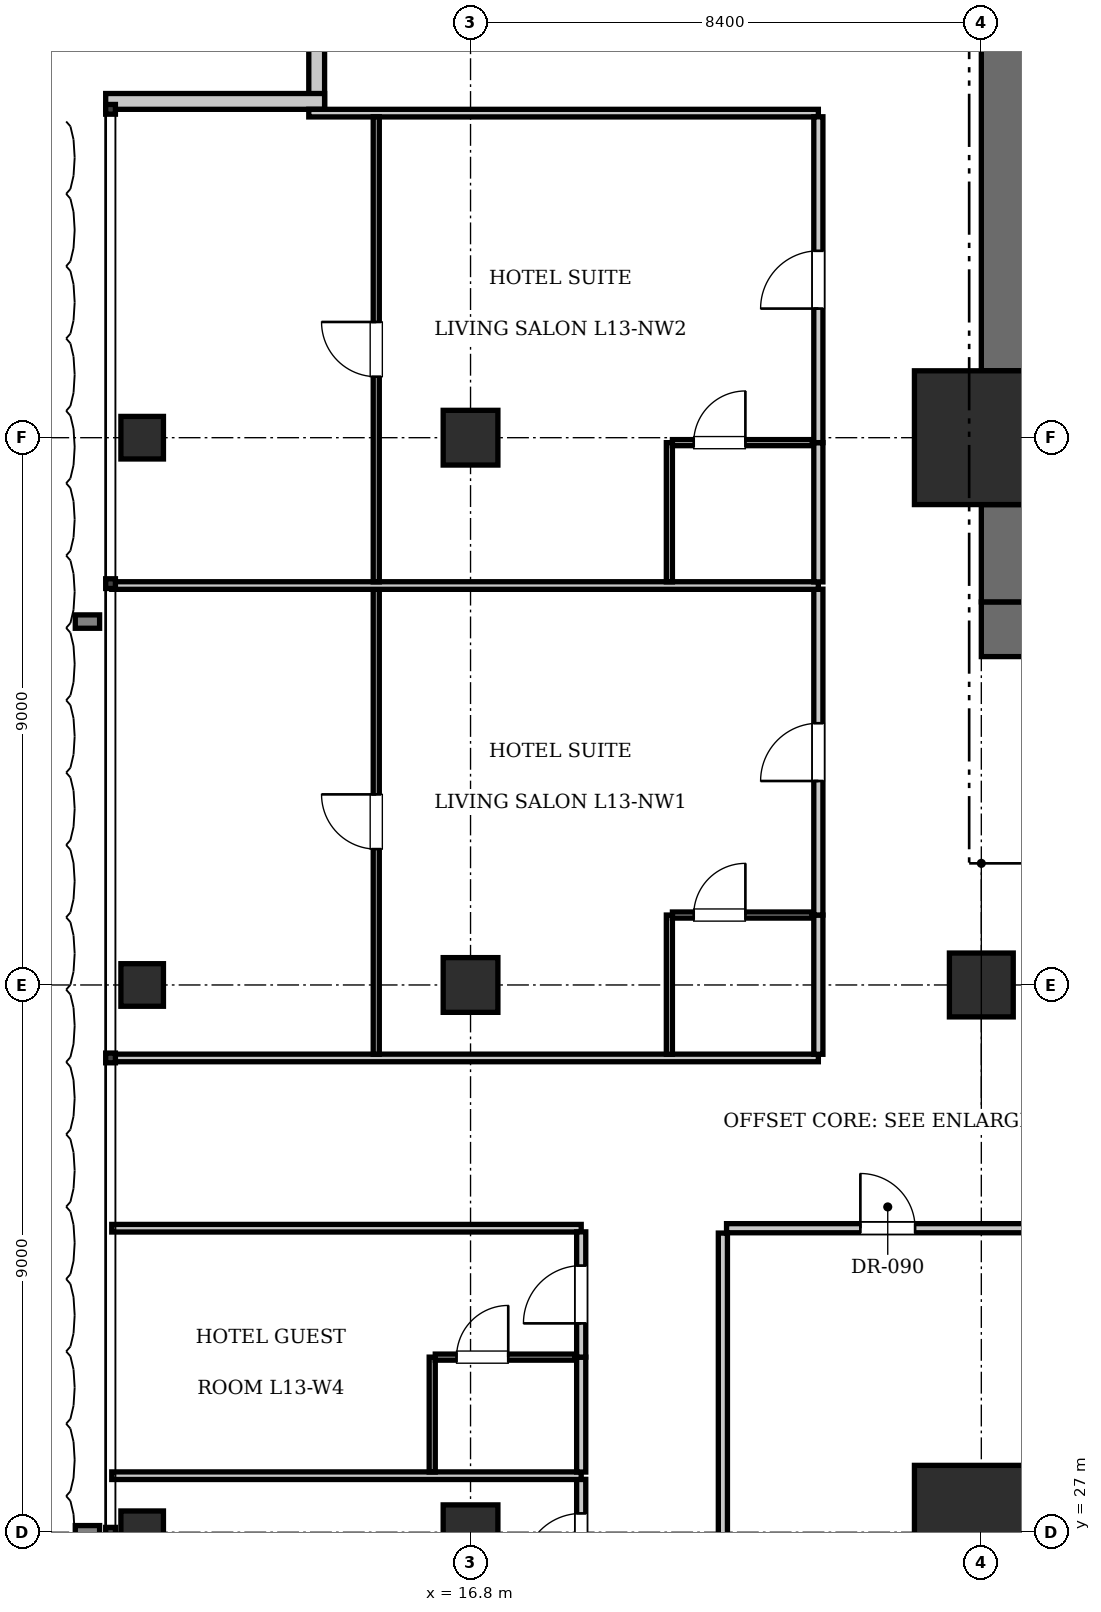
"""IFC4 building model, lengths in metres.
Left out: names, types, materials, properties, quantities, classifications, styles, units other than length and angle.
Written with IfcOpenShell. Run it as: python <this file> out.ifc"""

import sys

from ifc_helpers import new_model, si_unit, direction, frame, frame_2d, origin, origin_2d, place, context, subcontext, project, spatial, rectangle, i_section, extrude, element, fill, save


model = new_model("IFC4")
c1 = context("Model", 3, precision=1e-05, world=origin(), true_north=direction((0.0, 1.0)))
c2 = subcontext(c1, "Body", "Model", "MODEL_VIEW")
j1 = project(units=[si_unit("LENGTHUNIT", "METRE"), si_unit("PLANEANGLEUNIT", "RADIAN")], contexts=[c1])
p1 = place(None, origin())
s1 = spatial("IfcSite", under=j1, at=p1, CompositionType="ELEMENT")
p2 = place(p1, origin())
s2 = spatial("IfcBuilding", under=s1, at=p2, CompositionType="ELEMENT")
p3 = place(p2, frame((0.0, 0.0, 57.75)))
s3 = spatial("IfcBuildingStorey", under=s2, at=p3, CompositionType="ELEMENT", Elevation=57.75)
for number, where, z_axis, x_axis in (
    (1, (25.2, 27.0, 0.0), (0.0, 0.0, 1.0), (1.0, 0.0, 0.0)),
    (2, (25.2, 45.0, 0.0), (0.0, 0.0, 1.0), (1.0, 0.0, 0.0)),
):
    element("IfcColumn", number, at=place(p3, frame(where, z_axis=z_axis, x_axis=x_axis)), inside=s3, PredefinedType="COLUMN", context=c2, shape_type="SweptSolid", body=[
        extrude(rectangle(XDim=2.2, YDim=2.2, at=origin_2d()), origin(), (0.0, 0.0, 1.0), 3.85),
    ])
p4 = place(p3, frame((25.2, 41.85, 0.0), z_axis=(0.0, 0.0, 1.0), x_axis=(1.0, 0.0, 0.0)))
e3 = element("IfcWall", 3, at=p4, inside=s3, PredefinedType="SHEAR", context=c2, shape_type="SweptSolid", body=[
    extrude(rectangle(XDim=6.8, YDim=0.9, at=frame_2d((3.4, 0.0))), origin(), (0.0, 0.0, 1.0), 3.85),
])
p5 = place(p4, frame((1.65, 0.0, 0.0)))
e4 = element("IfcOpeningElement", 4, at=p5, cuts=e3, PredefinedType="OPENING", context=c2, shape_type="SweptSolid", body=[
    extrude(rectangle(XDim=1.15, YDim=2.15, at=frame_2d((0.575, 1.075))), frame((0.0, 0.46, 0.0), z_axis=(0.0, -1.0, 0.0), x_axis=(1.0, 0.0, 0.0)), (0.0, 0.0, 1.0), 0.92),
])
p6 = place(p4, frame((5.15, 0.0, 0.0)))
e5 = element("IfcOpeningElement", 5, at=p6, cuts=e3, PredefinedType="OPENING", context=c2, shape_type="SweptSolid", body=[
    extrude(rectangle(XDim=1.1, YDim=2.2, at=frame_2d((0.55, 1.1))), frame((0.0, 0.46, 0.0), z_axis=(0.0, -1.0, 0.0), x_axis=(1.0, 0.0, 0.0)), (0.0, 0.0, 1.0), 0.92),
])
p7 = place(p3, frame((25.65, 42.3, 0.0), z_axis=(0.0, 0.0, 1.0), x_axis=(0.0, 1.0, 0.0)))
e6 = element("IfcWall", 6, at=p7, inside=s3, PredefinedType="SHEAR", context=c2, shape_type="SweptSolid", body=[
    extrude(rectangle(XDim=1.6, YDim=0.9, at=frame_2d((0.8, 0.0))), origin(), (0.0, 0.0, 1.0), 3.85),
])
p8 = place(p3, frame((25.65, 46.1, 0.0), z_axis=(0.0, 0.0, 1.0), x_axis=(0.0, 1.0, 0.0)))
e7 = element("IfcWall", 7, at=p8, inside=s3, PredefinedType="SHEAR", context=c2, shape_type="SweptSolid", body=[
    extrude(rectangle(XDim=7.0, YDim=0.9, at=frame_2d((3.5, 0.0))), origin(), (0.0, 0.0, 1.0), 3.85),
])
p9 = place(p3, frame((25.2, 36.0, 0.0), z_axis=(0.0, 0.0, 1.0), x_axis=(1.0, 0.0, 0.0)))
e8 = element("IfcColumn", 8, at=p9, inside=s3, PredefinedType="COLUMN", context=c2, shape_type="SweptSolid", body=[
    extrude(rectangle(XDim=1.05, YDim=1.05, at=origin_2d()), origin(), (0.0, 0.0, 1.0), 3.85),
])
for number, where, z_axis, x_axis in (
    (9, (16.8, 27.0, 0.0), (0.0, 0.0, 1.0), (1.0, 0.0, 0.0)),
    (10, (16.8, 36.0, 0.0), (0.0, 0.0, 1.0), (1.0, 0.0, 0.0)),
    (11, (16.8, 45.0, 0.0), (0.0, 0.0, 1.0), (1.0, 0.0, 0.0)),
):
    element("IfcColumn", number, at=place(p3, frame(where, z_axis=z_axis, x_axis=x_axis)), inside=s3, PredefinedType="COLUMN", context=c2, shape_type="SweptSolid", body=[
        extrude(rectangle(XDim=0.9, YDim=0.9, at=origin_2d()), origin(), (0.0, 0.0, 1.0), 3.85),
    ])
for number, where, z_axis, x_axis in (
    (12, (11.4, 27.0, 0.0), (0.0, 0.0, 1.0), (1.0, 0.0, 0.0)),
    (13, (11.4, 36.0, 0.0), (0.0, 0.0, 1.0), (1.0, 0.0, 0.0)),
    (14, (11.4, 45.0, 0.0), (0.0, 0.0, 1.0), (1.0, 0.0, 0.0)),
):
    element("IfcColumn", number, at=place(p3, frame(where, z_axis=z_axis, x_axis=x_axis)), inside=s3, PredefinedType="COLUMN", context=c2, shape_type="SweptSolid", body=[
        extrude(i_section(OverallWidth=0.7, OverallDepth=0.7, WebThickness=0.028, FlangeThickness=0.044, at=origin_2d()), origin(), (0.0, 0.0, 1.0), 3.85),
    ])
p10 = place(p3, frame((14.27, 50.4, 0.0), z_axis=(0.0, 0.0, 1.0), x_axis=(0.0, 1.0, 0.0)))
e15 = element("IfcWall", 15, at=p10, inside=s3, PredefinedType="SOLIDWALL", context=c2, shape_type="SweptSolid", body=[
    extrude(rectangle(XDim=3.6, YDim=0.26, at=frame_2d((1.8, 0.0))), origin(), (0.0, 0.0, 1.0), 3.61),
])
p11 = place(p3, frame((10.8, 50.53, 0.0), z_axis=(0.0, 0.0, 1.0), x_axis=(1.0, 0.0, 0.0)))
e16 = element("IfcWall", 16, at=p11, inside=s3, PredefinedType="SOLIDWALL", context=c2, shape_type="SweptSolid", body=[
    extrude(rectangle(XDim=3.6, YDim=0.26, at=frame_2d((1.8, 0.0))), origin(), (0.0, 0.0, 1.0), 3.61),
])
p12 = place(p3, frame((20.95, 23.98, 0.0), z_axis=(0.0, 0.0, 1.0), x_axis=(0.0, 1.0, 0.0)))
e17 = element("IfcWall", 17, at=p12, inside=s3, PredefinedType="PARTITIONING", context=c2, shape_type="SweptSolid", body=[
    extrude(rectangle(XDim=7.94, YDim=0.15, at=frame_2d((3.97, 0.0))), origin(), (0.0, 0.0, 1.0), 3.255),
])
p13 = place(p3, frame((21.01, 32.0, 0.0), z_axis=(0.0, 0.0, 1.0), x_axis=(1.0, 0.0, 0.0)))
e18 = element("IfcWall", 18, at=p13, inside=s3, PredefinedType="PARTITIONING", context=c2, shape_type="SweptSolid", body=[
    extrude(rectangle(XDim=5.302, YDim=0.15, at=frame_2d((2.651, 0.0))), origin(), (0.0, 0.0, 1.0), 3.61),
])
p14 = place(p13, frame((2.201, 0.0, 0.0)))
e19 = element("IfcOpeningElement", 19, at=p14, cuts=e18, PredefinedType="OPENING", context=c2, shape_type="SweptSolid", body=[
    extrude(rectangle(XDim=0.9, YDim=2.1, at=frame_2d((0.45, 1.05))), frame((0.0, 0.085, 0.0), z_axis=(0.0, -1.0, 0.0), x_axis=(1.0, 0.0, 0.0)), (0.0, 0.0, 1.0), 0.17),
])
p15 = place(p3, frame((10.9, 32.0, 0.0), z_axis=(0.0, 0.0, 1.0), x_axis=(1.0, 0.0, 0.0)))
e20 = element("IfcWall", 20, at=p15, inside=s3, PredefinedType="PARTITIONING", context=c2, shape_type="SweptSolid", body=[
    extrude(rectangle(XDim=7.72, YDim=0.125, at=frame_2d((3.86, 0.0))), origin(), (0.0, 0.0, 1.0), 3.61),
])
p16 = place(p3, frame((18.62, 25.8, 0.0), z_axis=(0.0, 0.0, 1.0), x_axis=(0.0, 1.0, 0.0)))
e21 = element("IfcWall", 21, at=p16, inside=s3, PredefinedType="PARTITIONING", context=c2, shape_type="SweptSolid", body=[
    extrude(rectangle(XDim=2.07, YDim=0.15, at=frame_2d((1.035, 0.0))), origin(), (0.0, 0.0, 1.0), 3.61),
])
p17 = place(p16, frame((0.56, 0.0, 0.0)))
e22 = element("IfcOpeningElement", 22, at=p17, cuts=e21, PredefinedType="OPENING", context=c2, shape_type="SweptSolid", body=[
    extrude(rectangle(XDim=0.95, YDim=2.15, at=frame_2d((0.475, 1.075))), frame((0.0, 0.085, 0.0), z_axis=(0.0, -1.0, 0.0), x_axis=(1.0, 0.0, 0.0)), (0.0, 0.0, 1.0), 0.17),
])
p18 = place(p3, frame((10.9, 27.93, 0.0), z_axis=(0.0, 0.0, 1.0), x_axis=(1.0, 0.0, 0.0)))
e23 = element("IfcWall", 23, at=p18, inside=s3, PredefinedType="PARTITIONING", context=c2, shape_type="SweptSolid", body=[
    extrude(rectangle(XDim=7.72, YDim=0.125, at=frame_2d((3.86, 0.0))), origin(), (0.0, 0.0, 1.0), 3.61),
])
p19 = place(p3, frame((18.62, 27.99, 0.0), z_axis=(0.0, 0.0, 1.0), x_axis=(0.0, 1.0, 0.0)))
e24 = element("IfcWall", 24, at=p19, inside=s3, PredefinedType="PARTITIONING", context=c2, shape_type="SweptSolid", body=[
    extrude(rectangle(XDim=1.89, YDim=0.15, at=frame_2d((0.945, 0.0))), origin(), (0.0, 0.0, 1.0), 3.61),
])
p20 = place(p3, frame((18.62, 29.88, 0.0), z_axis=(0.0, 0.0, 1.0), x_axis=(0.0, 1.0, 0.0)))
e25 = element("IfcWall", 25, at=p20, inside=s3, PredefinedType="PARTITIONING", context=c2, shape_type="SweptSolid", body=[
    extrude(rectangle(XDim=2.06, YDim=0.15, at=frame_2d((1.03, 0.0))), origin(), (0.0, 0.0, 1.0), 3.61),
])
p21 = place(p20, frame((0.555, 0.0, 0.0)))
e26 = element("IfcOpeningElement", 26, at=p21, cuts=e25, PredefinedType="OPENING", context=c2, shape_type="SweptSolid", body=[
    extrude(rectangle(XDim=0.95, YDim=2.15, at=frame_2d((0.475, 1.075))), frame((0.0, 0.085, 0.0), z_axis=(0.0, -1.0, 0.0), x_axis=(1.0, 0.0, 0.0)), (0.0, 0.0, 1.0), 0.17),
])
p22 = place(p3, frame((16.17, 27.99, 0.0), z_axis=(0.0, 0.0, 1.0), x_axis=(0.0, 1.0, 0.0)))
e27 = element("IfcWall", 27, at=p22, inside=s3, PredefinedType="PARTITIONING", context=c2, shape_type="SweptSolid", body=[
    extrude(rectangle(XDim=1.89, YDim=0.1, at=frame_2d((0.945, 0.0))), origin(), (0.0, 0.0, 1.0), 3.61),
])
p23 = place(p3, frame((16.22, 29.88, 0.0), z_axis=(0.0, 0.0, 1.0), x_axis=(1.0, 0.0, 0.0)))
e28 = element("IfcWall", 28, at=p23, inside=s3, PredefinedType="PARTITIONING", context=c2, shape_type="SweptSolid", body=[
    extrude(rectangle(XDim=2.3, YDim=0.1, at=frame_2d((1.15, 0.0))), origin(), (0.0, 0.0, 1.0), 3.61),
])
p24 = place(p23, frame((0.35, 0.0, 0.0)))
e29 = element("IfcOpeningElement", 29, at=p24, cuts=e28, PredefinedType="OPENING", context=c2, shape_type="SweptSolid", body=[
    extrude(rectangle(XDim=0.85, YDim=2.1, at=frame_2d((0.425, 1.05))), frame((0.0, 0.06, 0.0), z_axis=(0.0, -1.0, 0.0), x_axis=(1.0, 0.0, 0.0)), (0.0, 0.0, 1.0), 0.12),
])
p25 = place(p3, frame((10.9, 34.8, 0.0), z_axis=(0.0, 0.0, 1.0), x_axis=(1.0, 0.0, 0.0)))
e30 = element("IfcWall", 30, at=p25, inside=s3, PredefinedType="PARTITIONING", context=c2, shape_type="SweptSolid", body=[
    extrude(rectangle(XDim=11.62, YDim=0.125, at=frame_2d((5.81, 0.0))), origin(), (0.0, 0.0, 1.0), 3.61),
])
p26 = place(p3, frame((14.14, 50.337, 0.0), z_axis=(0.0, 0.0, 1.0), x_axis=(1.0, 0.0, 0.0)))
e31 = element("IfcWall", 31, at=p26, inside=s3, PredefinedType="PARTITIONING", context=c2, shape_type="SweptSolid", body=[
    extrude(rectangle(XDim=8.38, YDim=0.125, at=frame_2d((4.19, 0.0))), origin(), (0.0, 0.0, 1.0), 3.61),
])
p27 = place(p3, frame((22.52, 34.86, 0.0), z_axis=(0.0, 0.0, 1.0), x_axis=(0.0, 1.0, 0.0)))
e32 = element("IfcWall", 32, at=p27, inside=s3, PredefinedType="PARTITIONING", context=c2, shape_type="SweptSolid", body=[
    extrude(rectangle(XDim=2.29, YDim=0.15, at=frame_2d((1.145, 0.0))), origin(), (0.0, 0.0, 1.0), 3.61),
])
p28 = place(p3, frame((22.52, 37.15, 0.0), z_axis=(0.0, 0.0, 1.0), x_axis=(0.0, 1.0, 0.0)))
e33 = element("IfcWall", 33, at=p28, inside=s3, PredefinedType="PARTITIONING", context=c2, shape_type="SweptSolid", body=[
    extrude(rectangle(XDim=5.359, YDim=0.15, at=frame_2d((2.679, 0.0))), origin(), (0.0, 0.0, 1.0), 3.61),
])
p29 = place(p28, frame((2.204, 0.0, 0.0)))
e34 = element("IfcOpeningElement", 34, at=p29, cuts=e33, PredefinedType="OPENING", context=c2, shape_type="SweptSolid", body=[
    extrude(rectangle(XDim=0.95, YDim=2.15, at=frame_2d((0.475, 1.075))), frame((0.0, 0.085, 0.0), z_axis=(0.0, -1.0, 0.0), x_axis=(1.0, 0.0, 0.0)), (0.0, 0.0, 1.0), 0.17),
])
p30 = place(p3, frame((20.07, 34.86, 0.0), z_axis=(0.0, 0.0, 1.0), x_axis=(0.0, 1.0, 0.0)))
e35 = element("IfcWall", 35, at=p30, inside=s3, PredefinedType="PARTITIONING", context=c2, shape_type="SweptSolid", body=[
    extrude(rectangle(XDim=2.29, YDim=0.1, at=frame_2d((1.145, 0.0))), origin(), (0.0, 0.0, 1.0), 3.61),
])
p31 = place(p3, frame((20.12, 37.15, 0.0), z_axis=(0.0, 0.0, 1.0), x_axis=(1.0, 0.0, 0.0)))
e36 = element("IfcWall", 36, at=p31, inside=s3, PredefinedType="PARTITIONING", context=c2, shape_type="SweptSolid", body=[
    extrude(rectangle(XDim=2.3, YDim=0.1, at=frame_2d((1.15, 0.0))), origin(), (0.0, 0.0, 1.0), 3.61),
])
p32 = place(p31, frame((0.35, 0.0, 0.0)))
e37 = element("IfcOpeningElement", 37, at=p32, cuts=e36, PredefinedType="OPENING", context=c2, shape_type="SweptSolid", body=[
    extrude(rectangle(XDim=0.85, YDim=2.1, at=frame_2d((0.425, 1.05))), frame((0.0, 0.06, 0.0), z_axis=(0.0, -1.0, 0.0), x_axis=(1.0, 0.0, 0.0)), (0.0, 0.0, 1.0), 0.12),
])
p33 = place(p3, frame((15.25, 34.86, 0.0), z_axis=(0.0, 0.0, 1.0), x_axis=(0.0, 1.0, 0.0)))
e38 = element("IfcWall", 38, at=p33, inside=s3, PredefinedType="PARTITIONING", context=c2, shape_type="SweptSolid", body=[
    extrude(rectangle(XDim=7.649, YDim=0.1, at=frame_2d((3.824, 0.0))), origin(), (0.0, 0.0, 1.0), 3.61),
])
p34 = place(p33, frame((3.374, 0.0, 0.0)))
e39 = element("IfcOpeningElement", 39, at=p34, cuts=e38, PredefinedType="OPENING", context=c2, shape_type="SweptSolid", body=[
    extrude(rectangle(XDim=0.9, YDim=2.1, at=frame_2d((0.45, 1.05))), frame((0.0, 0.06, 0.0), z_axis=(0.0, -1.0, 0.0), x_axis=(1.0, 0.0, 0.0)), (0.0, 0.0, 1.0), 0.12),
])
p35 = place(p3, frame((10.9, 42.569, 0.0), z_axis=(0.0, 0.0, 1.0), x_axis=(1.0, 0.0, 0.0)))
e40 = element("IfcWall", 40, at=p35, inside=s3, PredefinedType="PARTITIONING", context=c2, shape_type="SweptSolid", body=[
    extrude(rectangle(XDim=11.62, YDim=0.125, at=frame_2d((5.81, 0.0))), origin(), (0.0, 0.0, 1.0), 3.61),
])
p36 = place(p3, frame((22.52, 42.629, 0.0), z_axis=(0.0, 0.0, 1.0), x_axis=(0.0, 1.0, 0.0)))
e41 = element("IfcWall", 41, at=p36, inside=s3, PredefinedType="PARTITIONING", context=c2, shape_type="SweptSolid", body=[
    extrude(rectangle(XDim=2.29, YDim=0.15, at=frame_2d((1.145, 0.0))), origin(), (0.0, 0.0, 1.0), 3.61),
])
p37 = place(p3, frame((22.52, 44.919, 0.0), z_axis=(0.0, 0.0, 1.0), x_axis=(0.0, 1.0, 0.0)))
e42 = element("IfcWall", 42, at=p37, inside=s3, PredefinedType="PARTITIONING", context=c2, shape_type="SweptSolid", body=[
    extrude(rectangle(XDim=5.359, YDim=0.15, at=frame_2d((2.679, 0.0))), origin(), (0.0, 0.0, 1.0), 3.61),
])
p38 = place(p37, frame((2.204, 0.0, 0.0)))
e43 = element("IfcOpeningElement", 43, at=p38, cuts=e42, PredefinedType="OPENING", context=c2, shape_type="SweptSolid", body=[
    extrude(rectangle(XDim=0.95, YDim=2.15, at=frame_2d((0.475, 1.075))), frame((0.0, 0.085, 0.0), z_axis=(0.0, -1.0, 0.0), x_axis=(1.0, 0.0, 0.0)), (0.0, 0.0, 1.0), 0.17),
])
p39 = place(p3, frame((20.07, 42.629, 0.0), z_axis=(0.0, 0.0, 1.0), x_axis=(0.0, 1.0, 0.0)))
e44 = element("IfcWall", 44, at=p39, inside=s3, PredefinedType="PARTITIONING", context=c2, shape_type="SweptSolid", body=[
    extrude(rectangle(XDim=2.29, YDim=0.1, at=frame_2d((1.145, 0.0))), origin(), (0.0, 0.0, 1.0), 3.61),
])
p40 = place(p3, frame((20.12, 44.919, 0.0), z_axis=(0.0, 0.0, 1.0), x_axis=(1.0, 0.0, 0.0)))
e45 = element("IfcWall", 45, at=p40, inside=s3, PredefinedType="PARTITIONING", context=c2, shape_type="SweptSolid", body=[
    extrude(rectangle(XDim=2.3, YDim=0.1, at=frame_2d((1.15, 0.0))), origin(), (0.0, 0.0, 1.0), 2.988),
])
p41 = place(p40, frame((0.35, 0.0, 0.0)))
e46 = element("IfcOpeningElement", 46, at=p41, cuts=e45, PredefinedType="OPENING", context=c2, shape_type="SweptSolid", body=[
    extrude(rectangle(XDim=0.85, YDim=2.1, at=frame_2d((0.425, 1.05))), frame((0.0, 0.06, 0.0), z_axis=(0.0, -1.0, 0.0), x_axis=(1.0, 0.0, 0.0)), (0.0, 0.0, 1.0), 0.12),
])
p42 = place(p3, frame((15.25, 42.629, 0.0), z_axis=(0.0, 0.0, 1.0), x_axis=(0.0, 1.0, 0.0)))
e47 = element("IfcWall", 47, at=p42, inside=s3, PredefinedType="PARTITIONING", context=c2, shape_type="SweptSolid", body=[
    extrude(rectangle(XDim=7.649, YDim=0.1, at=frame_2d((3.824, 0.0))), origin(), (0.0, 0.0, 1.0), 3.61),
])
p43 = place(p42, frame((3.375, 0.0, 0.0)))
e48 = element("IfcOpeningElement", 48, at=p43, cuts=e47, PredefinedType="OPENING", context=c2, shape_type="SweptSolid", body=[
    extrude(rectangle(XDim=0.9, YDim=2.1, at=frame_2d((0.45, 1.05))), frame((0.0, 0.06, 0.0), z_axis=(0.0, -1.0, 0.0), x_axis=(1.0, 0.0, 0.0)), (0.0, 0.0, 1.0), 0.12),
])
p44 = place(p14, origin())
e49 = element("IfcDoor", 49, at=p44, inside=s3, OperationType="SINGLE_SWING_LEFT", PredefinedType="DOOR", context=c2, shape_type="SweptSolid", body=[
    extrude(rectangle(XDim=0.9, YDim=2.1, at=frame_2d((0.45, 1.05))), frame((0.0, 0.025, 0.0), z_axis=(0.0, -1.0, 0.0), x_axis=(1.0, 0.0, 0.0)), (0.0, 0.0, 1.0), 0.05),
])
fill(e19, e49)
p45 = place(p17, origin())
e50 = element("IfcDoor", 50, at=p45, inside=s3, OperationType="SINGLE_SWING_LEFT", PredefinedType="DOOR", context=c2, shape_type="SweptSolid", body=[
    extrude(rectangle(XDim=0.95, YDim=2.15, at=frame_2d((0.475, 1.075))), frame((0.0, 0.025, 0.0), z_axis=(0.0, -1.0, 0.0), x_axis=(1.0, 0.0, 0.0)), (0.0, 0.0, 1.0), 0.05),
])
fill(e22, e50)
p46 = place(p24, origin())
e51 = element("IfcDoor", 51, at=p46, inside=s3, OperationType="SINGLE_SWING_RIGHT", PredefinedType="DOOR", context=c2, shape_type="SweptSolid", body=[
    extrude(rectangle(XDim=0.85, YDim=2.1, at=frame_2d((0.425, 1.05))), frame((0.0, 0.025, 0.0), z_axis=(0.0, -1.0, 0.0), x_axis=(1.0, 0.0, 0.0)), (0.0, 0.0, 1.0), 0.05),
])
fill(e29, e51)
p47 = place(p21, origin())
e52 = element("IfcDoor", 52, at=p47, inside=s3, OperationType="SINGLE_SWING_LEFT", PredefinedType="DOOR", context=c2, shape_type="SweptSolid", body=[
    extrude(rectangle(XDim=0.95, YDim=2.15, at=frame_2d((0.475, 1.075))), frame((0.0, 0.025, 0.0), z_axis=(0.0, -1.0, 0.0), x_axis=(1.0, 0.0, 0.0)), (0.0, 0.0, 1.0), 0.05),
])
fill(e26, e52)
p48 = place(p32, origin())
e53 = element("IfcDoor", 53, at=p48, inside=s3, OperationType="SINGLE_SWING_RIGHT", PredefinedType="DOOR", context=c2, shape_type="SweptSolid", body=[
    extrude(rectangle(XDim=0.85, YDim=2.1, at=frame_2d((0.425, 1.05))), frame((0.0, 0.025, 0.0), z_axis=(0.0, -1.0, 0.0), x_axis=(1.0, 0.0, 0.0)), (0.0, 0.0, 1.0), 0.05),
])
fill(e37, e53)
p49 = place(p29, origin())
e54 = element("IfcDoor", 54, at=p49, inside=s3, OperationType="SINGLE_SWING_LEFT", PredefinedType="DOOR", context=c2, shape_type="SweptSolid", body=[
    extrude(rectangle(XDim=0.95, YDim=2.15, at=frame_2d((0.475, 1.075))), frame((0.0, 0.025, 0.0), z_axis=(0.0, -1.0, 0.0), x_axis=(1.0, 0.0, 0.0)), (0.0, 0.0, 1.0), 0.05),
])
fill(e34, e54)
p50 = place(p34, origin())
e55 = element("IfcDoor", 55, at=p50, inside=s3, OperationType="SINGLE_SWING_RIGHT", PredefinedType="DOOR", context=c2, shape_type="SweptSolid", body=[
    extrude(rectangle(XDim=0.9, YDim=2.1, at=frame_2d((0.45, 1.05))), frame((0.0, 0.025, 0.0), z_axis=(0.0, -1.0, 0.0), x_axis=(1.0, 0.0, 0.0)), (0.0, 0.0, 1.0), 0.05),
])
fill(e39, e55)
p51 = place(p41, origin())
e56 = element("IfcDoor", 56, at=p51, inside=s3, OperationType="SINGLE_SWING_RIGHT", PredefinedType="DOOR", context=c2, shape_type="SweptSolid", body=[
    extrude(rectangle(XDim=0.85, YDim=2.1, at=frame_2d((0.425, 1.05))), frame((0.0, 0.025, 0.0), z_axis=(0.0, -1.0, 0.0), x_axis=(1.0, 0.0, 0.0)), (0.0, 0.0, 1.0), 0.05),
])
fill(e46, e56)
p52 = place(p38, origin())
e57 = element("IfcDoor", 57, at=p52, inside=s3, OperationType="SINGLE_SWING_LEFT", PredefinedType="DOOR", context=c2, shape_type="SweptSolid", body=[
    extrude(rectangle(XDim=0.95, YDim=2.15, at=frame_2d((0.475, 1.075))), frame((0.0, 0.025, 0.0), z_axis=(0.0, -1.0, 0.0), x_axis=(1.0, 0.0, 0.0)), (0.0, 0.0, 1.0), 0.05),
])
fill(e43, e57)
p53 = place(p43, origin())
e58 = element("IfcDoor", 58, at=p53, inside=s3, OperationType="SINGLE_SWING_RIGHT", PredefinedType="DOOR", context=c2, shape_type="SweptSolid", body=[
    extrude(rectangle(XDim=0.9, YDim=2.1, at=frame_2d((0.45, 1.05))), frame((0.0, 0.025, 0.0), z_axis=(0.0, -1.0, 0.0), x_axis=(1.0, 0.0, 0.0)), (0.0, 0.0, 1.0), 0.05),
])
fill(e48, e58)
save(model, sys.argv[1])
